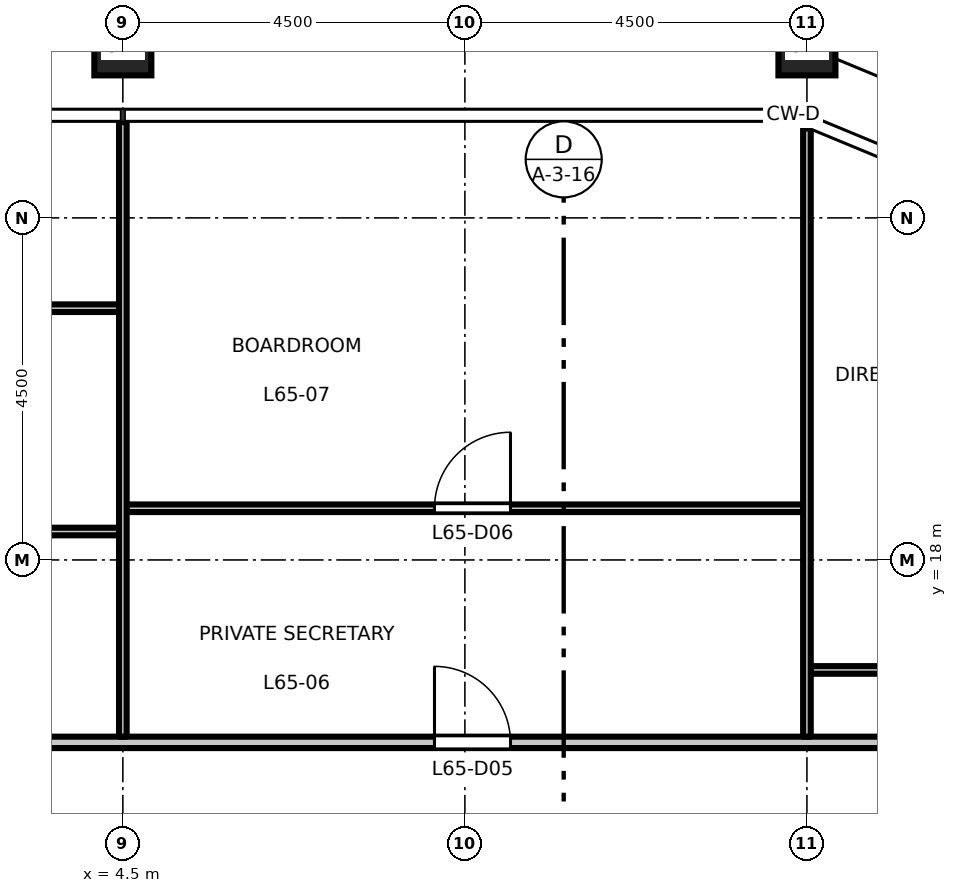
"""IFC4 building model, lengths in metres.
Left out: names, types, materials, properties, quantities, classifications, styles, units other than length and angle.
Written with IfcOpenShell. Run it as: python <this file> out.ifc"""

import sys

from ifc_helpers import new_model, si_unit, direction, frame, frame_2d, origin, origin_2d, place, context, subcontext, project, spatial, rectangle, hollow_rectangle, extrude, element, fill, save


model = new_model("IFC4")
c1 = context("Model", 3, precision=1e-05, world=origin(), true_north=direction((0.0, 1.0)))
c2 = subcontext(c1, "Body", "Model", "MODEL_VIEW")
j1 = project(units=[si_unit("LENGTHUNIT", "METRE"), si_unit("PLANEANGLEUNIT", "RADIAN")], contexts=[c1])
p1 = place(None, origin())
s1 = spatial("IfcSite", under=j1, at=p1, CompositionType="ELEMENT")
p2 = place(p1, origin())
s2 = spatial("IfcBuilding", under=s1, at=p2, CompositionType="ELEMENT")
p3 = place(p2, frame((0.0, 0.0, 303.2)))
s3 = spatial("IfcBuildingStorey", under=s2, at=p3, CompositionType="ELEMENT", Elevation=303.2)
for number, where, z_axis, x_axis in (
    (1, (13.5, 24.75, 0.0), (0.0, 0.0, 1.0), (1.0, 0.0, 0.0)),
    (2, (4.5, 24.75, 0.0), (0.0, 0.0, 1.0), (1.0, 0.0, 0.0)),
):
    element("IfcColumn", number, at=place(p3, frame(where, z_axis=z_axis, x_axis=x_axis)), inside=s3, PredefinedType="COLUMN", context=c2, shape_type="SweptSolid", body=[
        extrude(hollow_rectangle(XDim=0.75, YDim=0.75, WallThickness=0.04, at=origin_2d()), origin(), (0.0, 0.0, 1.0), 4.5),
    ])
p4 = place(p3, frame((-19.425, 15.6, 0.0), z_axis=(0.0, 0.0, 1.0), x_axis=(1.0, 0.0, 0.0)))
e3 = element("IfcWall", 3, at=p4, inside=s3, PredefinedType="PARTITIONING", context=c2, shape_type="SweptSolid", body=[
    extrude(rectangle(XDim=38.85, YDim=0.15, at=frame_2d((19.425, 0.0))), origin(), (0.0, 0.0, 1.0), 4.35),
])
p5 = place(p4, frame((10.025, 0.0, 0.0)))
e4 = element("IfcOpeningElement", 4, at=p5, cuts=e3, PredefinedType="OPENING", context=c2, shape_type="SweptSolid", body=[
    extrude(rectangle(XDim=1.0, YDim=2.1, at=frame_2d((0.5, 1.05))), frame((0.0, 0.085, 0.0), z_axis=(0.0, -1.0, 0.0), x_axis=(1.0, 0.0, 0.0)), (0.0, 0.0, 1.0), 0.17),
])
p6 = place(p4, frame((19.025, 0.0, 0.0)))
e5 = element("IfcOpeningElement", 5, at=p6, cuts=e3, PredefinedType="OPENING", context=c2, shape_type="SweptSolid", body=[
    extrude(rectangle(XDim=1.0, YDim=2.1, at=frame_2d((0.5, 1.05))), frame((0.0, 0.085, 0.0), z_axis=(0.0, -1.0, 0.0), x_axis=(1.0, 0.0, 0.0)), (0.0, 0.0, 1.0), 0.17),
])
p7 = place(p4, frame((28.025, 0.0, 0.0)))
e6 = element("IfcOpeningElement", 6, at=p7, cuts=e3, PredefinedType="OPENING", context=c2, shape_type="SweptSolid", body=[
    extrude(rectangle(XDim=1.0, YDim=2.1, at=frame_2d((0.5, 1.05))), frame((0.0, 0.085, 0.0), z_axis=(0.0, -1.0, 0.0), x_axis=(1.0, 0.0, 0.0)), (0.0, 0.0, 1.0), 0.17),
])
p8 = place(p3, frame((13.55, 16.553, 0.0), z_axis=(0.0, 0.0, 1.0), x_axis=(1.0, 0.0, 0.0)))
e7 = element("IfcWall", 7, at=p8, inside=s3, PredefinedType="PARTITIONING", context=c2, shape_type="SweptSolid", body=[
    extrude(rectangle(XDim=8.863, YDim=0.1, at=frame_2d((4.432, 0.0))), origin(), (0.0, 0.0, 1.0), 4.35),
])
p9 = place(p8, frame((5.963, 0.0, 0.0)))
e8 = element("IfcOpeningElement", 8, at=p9, cuts=e7, PredefinedType="OPENING", context=c2, shape_type="SweptSolid", body=[
    extrude(rectangle(XDim=1.0, YDim=2.1, at=frame_2d((0.5, 1.05))), frame((0.0, 0.06, 0.0), z_axis=(0.0, -1.0, 0.0), x_axis=(1.0, 0.0, 0.0)), (0.0, 0.0, 1.0), 0.12),
])
p10 = place(p3, frame((-4.45, 18.374, 0.0), z_axis=(0.0, 0.0, 1.0), x_axis=(1.0, 0.0, 0.0)))
e9 = element("IfcWall", 9, at=p10, inside=s3, PredefinedType="PARTITIONING", context=c2, shape_type="SweptSolid", body=[
    extrude(rectangle(XDim=8.9, YDim=0.1, at=frame_2d((4.45, 0.0))), origin(), (0.0, 0.0, 1.0), 4.35),
])
p11 = place(p10, frame((4.05, 0.0, 0.0)))
e10 = element("IfcOpeningElement", 10, at=p11, cuts=e9, PredefinedType="OPENING", context=c2, shape_type="SweptSolid", body=[
    extrude(rectangle(XDim=1.0, YDim=2.1, at=frame_2d((0.5, 1.05))), frame((0.0, 0.06, 0.0), z_axis=(0.0, -1.0, 0.0), x_axis=(1.0, 0.0, 0.0)), (0.0, 0.0, 1.0), 0.12),
])
p12 = place(p3, frame((4.55, 18.68, 0.0), z_axis=(0.0, 0.0, 1.0), x_axis=(1.0, 0.0, 0.0)))
e11 = element("IfcWall", 11, at=p12, inside=s3, PredefinedType="PARTITIONING", context=c2, shape_type="SweptSolid", body=[
    extrude(rectangle(XDim=8.9, YDim=0.1, at=frame_2d((4.45, 0.0))), origin(), (0.0, 0.0, 1.0), 4.35),
])
p13 = place(p12, frame((4.05, 0.0, 0.0)))
e12 = element("IfcOpeningElement", 12, at=p13, cuts=e11, PredefinedType="OPENING", context=c2, shape_type="SweptSolid", body=[
    extrude(rectangle(XDim=1.0, YDim=2.1, at=frame_2d((0.5, 1.05))), frame((0.0, 0.06, 0.0), z_axis=(0.0, -1.0, 0.0), x_axis=(1.0, 0.0, 0.0)), (0.0, 0.0, 1.0), 0.12),
])
p14 = place(p3, frame((-4.45, 21.312, 0.0), z_axis=(0.0, 0.0, 1.0), x_axis=(1.0, 0.0, 0.0)))
e13 = element("IfcWall", 13, at=p14, inside=s3, PredefinedType="PARTITIONING", context=c2, shape_type="SweptSolid", body=[
    extrude(rectangle(XDim=8.9, YDim=0.1, at=frame_2d((4.45, 0.0))), origin(), (0.0, 0.0, 1.0), 4.35),
])
p15 = place(p14, frame((4.05, 0.0, 0.0)))
e14 = element("IfcOpeningElement", 14, at=p15, cuts=e13, PredefinedType="OPENING", context=c2, shape_type="SweptSolid", body=[
    extrude(rectangle(XDim=1.0, YDim=2.1, at=frame_2d((0.5, 1.05))), frame((0.0, 0.06, 0.0), z_axis=(0.0, -1.0, 0.0), x_axis=(1.0, 0.0, 0.0)), (0.0, 0.0, 1.0), 0.12),
])
p16 = place(p3, frame((4.5, 15.675, 0.0), z_axis=(0.0, 0.0, 1.0), x_axis=(0.0, 1.0, 0.0)))
e15 = element("IfcWall", 15, at=p16, inside=s3, PredefinedType="PARTITIONING", context=c2, shape_type="SweptSolid", body=[
    extrude(rectangle(XDim=8.085, YDim=0.1, at=frame_2d((4.042, 0.0))), origin(), (0.0, 0.0, 1.0), 3.65),
])
p17 = place(p3, frame((13.5, 15.675, 0.0), z_axis=(0.0, 0.0, 1.0), x_axis=(0.0, 1.0, 0.0)))
e16 = element("IfcWall", 16, at=p17, inside=s3, PredefinedType="PARTITIONING", context=c2, shape_type="SweptSolid", body=[
    extrude(rectangle(XDim=8.003, YDim=0.1, at=frame_2d((4.001, 0.0))), origin(), (0.0, 0.0, 1.0), 3.75),
])
p18 = place(p7, origin())
e17 = element("IfcDoor", 17, at=p18, inside=s3, OperationType="SINGLE_SWING_LEFT", PredefinedType="DOOR", context=c2, shape_type="SweptSolid", body=[
    extrude(rectangle(XDim=1.0, YDim=2.1, at=frame_2d((0.5, 1.05))), frame((0.0, 0.025, 0.0), z_axis=(0.0, -1.0, 0.0), x_axis=(1.0, 0.0, 0.0)), (0.0, 0.0, 1.0), 0.05),
])
fill(e6, e17)
p19 = place(p13, origin())
e18 = element("IfcDoor", 18, at=p19, inside=s3, OperationType="SINGLE_SWING_RIGHT", PredefinedType="DOOR", context=c2, shape_type="SweptSolid", body=[
    extrude(rectangle(XDim=1.0, YDim=2.1, at=frame_2d((0.5, 1.05))), frame((0.0, 0.025, 0.0), z_axis=(0.0, -1.0, 0.0), x_axis=(1.0, 0.0, 0.0)), (0.0, 0.0, 1.0), 0.05),
])
fill(e12, e18)
save(model, sys.argv[1])
